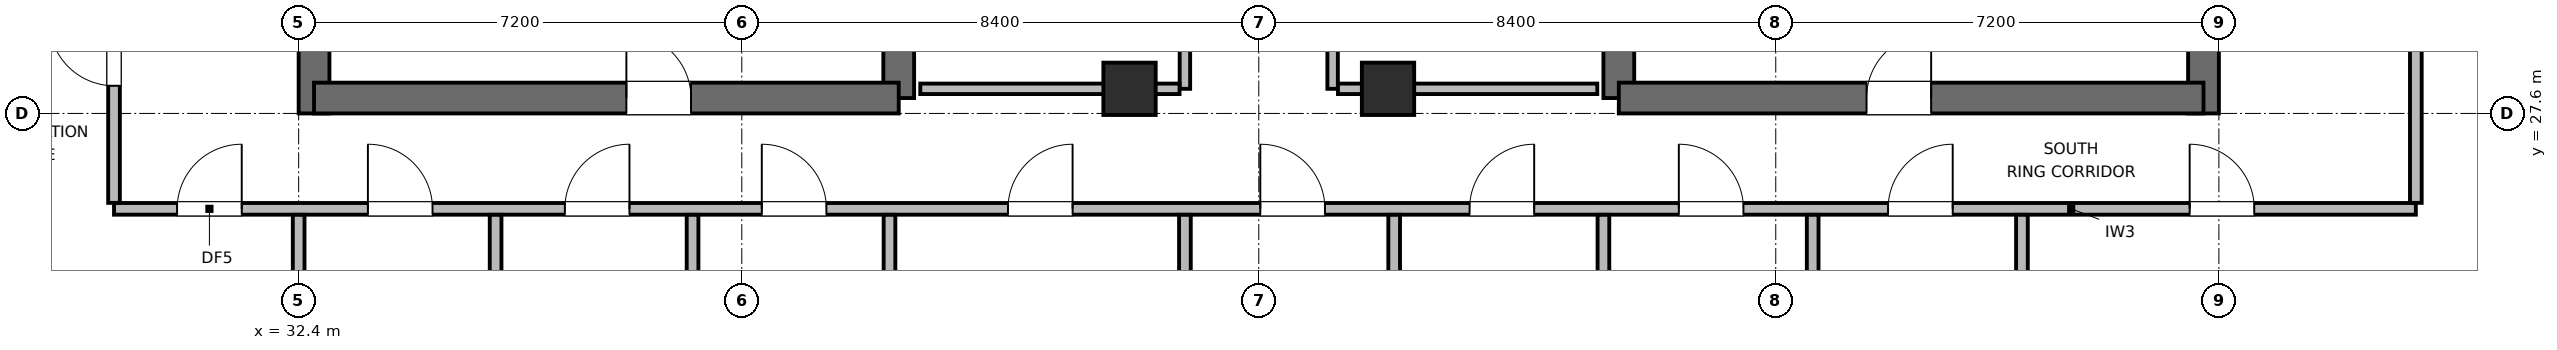
"""IFC4 building model, lengths in metres.
Left out: names, types, materials, properties, quantities, classifications, styles, units other than length and angle.
Written with IfcOpenShell. Run it as: python <this file> out.ifc"""

import sys

from ifc_helpers import new_model, si_unit, direction, frame, frame_2d, origin, origin_2d, place, context, subcontext, project, spatial, rectangle, extrude, element, fill, save


model = new_model("IFC4")
c1 = context("Model", 3, precision=1e-05, world=origin(), true_north=direction((0.0, 1.0)))
c2 = subcontext(c1, "Body", "Model", "MODEL_VIEW")
j1 = project(units=[si_unit("LENGTHUNIT", "METRE"), si_unit("PLANEANGLEUNIT", "RADIAN")], contexts=[c1])
p1 = place(None, origin())
s1 = spatial("IfcSite", under=j1, at=p1, CompositionType="ELEMENT")
p2 = place(p1, origin())
s2 = spatial("IfcBuilding", under=s1, at=p2, CompositionType="ELEMENT")
p3 = place(p2, frame((0.0, 0.0, 346.5)))
s3 = spatial("IfcBuildingStorey", under=s2, at=p3, CompositionType="ELEMENT", Elevation=346.5)
p4 = place(p3, frame((32.65, 27.6, 0.0), z_axis=(0.0, 0.0, 1.0), x_axis=(0.0, 1.0, 0.0)))
e1 = element("IfcWall", 1, at=p4, inside=s3, PredefinedType="SHEAR", context=c2, shape_type="SweptSolid", body=[
    extrude(rectangle(XDim=16.8, YDim=0.5, at=frame_2d((8.4, 0.0))), origin(), (0.0, 0.0, 1.0), 3.9),
])
p5 = place(p3, frame((42.15, 27.85, 0.0), z_axis=(0.0, 0.0, 1.0), x_axis=(0.0, 1.0, 0.0)))
e2 = element("IfcWall", 2, at=p5, inside=s3, PredefinedType="SHEAR", context=c2, shape_type="SweptSolid", body=[
    extrude(rectangle(XDim=6.55, YDim=0.5, at=frame_2d((3.275, 0.0))), origin(), (0.0, 0.0, 1.0), 3.9),
])
p6 = place(p3, frame((32.65, 27.85, 0.0), z_axis=(0.0, 0.0, 1.0), x_axis=(1.0, 0.0, 0.0)))
e3 = element("IfcWall", 3, at=p6, inside=s3, PredefinedType="SHEAR", context=c2, shape_type="SweptSolid", body=[
    extrude(rectangle(XDim=9.5, YDim=0.5, at=frame_2d((4.75, 0.0))), origin(), (0.0, 0.0, 1.0), 3.9),
])
p7 = place(p6, frame((5.075, 0.0, 0.0)))
e4 = element("IfcOpeningElement", 4, at=p7, cuts=e3, PredefinedType="OPENING", context=c2, shape_type="SweptSolid", body=[
    extrude(rectangle(XDim=1.05, YDim=2.04, at=frame_2d((0.525, 1.02))), frame((0.0, 0.26, 0.0), z_axis=(0.0, -1.0, 0.0), x_axis=(1.0, 0.0, 0.0)), (0.0, 0.0, 1.0), 0.52),
])
p8 = place(p3, frame((53.85, 27.85, 0.0), z_axis=(0.0, 0.0, 1.0), x_axis=(0.0, 1.0, 0.0)))
e5 = element("IfcWall", 5, at=p8, inside=s3, PredefinedType="SHEAR", context=c2, shape_type="SweptSolid", body=[
    extrude(rectangle(XDim=7.95, YDim=0.5, at=frame_2d((3.975, 0.0))), origin(), (0.0, 0.0, 1.0), 3.9),
])
p9 = place(p3, frame((63.35, 27.6, 0.0), z_axis=(0.0, 0.0, 1.0), x_axis=(0.0, 1.0, 0.0)))
e6 = element("IfcWall", 6, at=p9, inside=s3, PredefinedType="SHEAR", context=c2, shape_type="SweptSolid", body=[
    extrude(rectangle(XDim=16.8, YDim=0.5, at=frame_2d((8.4, 0.0))), origin(), (0.0, 0.0, 1.0), 3.9),
])
p10 = place(p3, frame((53.85, 27.85, 0.0), z_axis=(0.0, 0.0, 1.0), x_axis=(1.0, 0.0, 0.0)))
e7 = element("IfcWall", 7, at=p10, inside=s3, PredefinedType="SHEAR", context=c2, shape_type="SweptSolid", body=[
    extrude(rectangle(XDim=9.5, YDim=0.5, at=frame_2d((4.75, 0.0))), origin(), (0.0, 0.0, 1.0), 3.9),
])
p11 = place(p10, frame((4.025, 0.0, 0.0)))
e8 = element("IfcOpeningElement", 8, at=p11, cuts=e7, PredefinedType="OPENING", context=c2, shape_type="SweptSolid", body=[
    extrude(rectangle(XDim=1.05, YDim=2.04, at=frame_2d((0.525, 1.02))), frame((0.0, 0.26, 0.0), z_axis=(0.0, -1.0, 0.0), x_axis=(1.0, 0.0, 0.0)), (0.0, 0.0, 1.0), 0.52),
])
for number, where, z_axis, x_axis in (
    (9, (45.9, 28.0, 0.0), (0.0, 0.0, 1.0), (1.0, 0.0, 0.0)),
    (10, (50.1, 28.0, 0.0), (0.0, 0.0, 1.0), (1.0, 0.0, 0.0)),
):
    element("IfcColumn", number, at=place(p3, frame(where, z_axis=z_axis, x_axis=x_axis)), inside=s3, PredefinedType="COLUMN", context=c2, shape_type="SweptSolid", body=[
        extrude(rectangle(XDim=0.85, YDim=0.85, at=origin_2d()), origin(), (0.0, 0.0, 1.0), 3.9),
    ])
p12 = place(p3, frame((46.8, 28.0, 0.0), z_axis=(0.0, 0.0, 1.0), x_axis=(0.0, 1.0, 0.0)))
e11 = element("IfcWall", 11, at=p12, inside=s3, PredefinedType="PARTITIONING", context=c2, shape_type="SweptSolid", body=[
    extrude(rectangle(XDim=4.5, YDim=0.17, at=frame_2d((2.25, 0.0))), origin(), (0.0, 0.0, 1.0), 3.68),
])
p13 = place(p12, frame((0.99, 0.0, 0.0)))
e12 = element("IfcOpeningElement", 12, at=p13, cuts=e11, PredefinedType="OPENING", context=c2, shape_type="SweptSolid", body=[
    extrude(rectangle(XDim=0.9, YDim=2.02, at=frame_2d((0.45, 1.01))), frame((0.0, 0.095, 0.0), z_axis=(0.0, -1.0, 0.0), x_axis=(1.0, 0.0, 0.0)), (0.0, 0.0, 1.0), 0.19),
])
p14 = place(p12, frame((3.24, 0.0, 0.0)))
e13 = element("IfcOpeningElement", 13, at=p14, cuts=e11, PredefinedType="OPENING", context=c2, shape_type="SweptSolid", body=[
    extrude(rectangle(XDim=0.9, YDim=2.02, at=frame_2d((0.45, 1.01))), frame((0.0, 0.095, 0.0), z_axis=(0.0, -1.0, 0.0), x_axis=(1.0, 0.0, 0.0)), (0.0, 0.0, 1.0), 0.19),
])
p15 = place(p3, frame((42.5, 28.0, 0.0), z_axis=(0.0, 0.0, 1.0), x_axis=(1.0, 0.0, 0.0)))
e14 = element("IfcWall", 14, at=p15, inside=s3, PredefinedType="PARTITIONING", context=c2, shape_type="SweptSolid", body=[
    extrude(rectangle(XDim=4.213, YDim=0.17, at=frame_2d((2.106, 0.0))), origin(), (0.0, 0.0, 1.0), 2.765),
])
p16 = place(p3, frame((49.2, 28.0, 0.0), z_axis=(0.0, 0.0, 1.0), x_axis=(0.0, 1.0, 0.0)))
e15 = element("IfcWall", 15, at=p16, inside=s3, PredefinedType="PARTITIONING", context=c2, shape_type="SweptSolid", body=[
    extrude(rectangle(XDim=4.5, YDim=0.17, at=frame_2d((2.25, 0.0))), origin(), (0.0, 0.0, 1.0), 3.68),
])
p17 = place(p16, frame((0.675, 0.0, 0.0)))
e16 = element("IfcOpeningElement", 16, at=p17, cuts=e15, PredefinedType="OPENING", context=c2, shape_type="SweptSolid", body=[
    extrude(rectangle(XDim=0.9, YDim=2.02, at=frame_2d((0.45, 1.01))), frame((0.0, 0.095, 0.0), z_axis=(0.0, -1.0, 0.0), x_axis=(1.0, 0.0, 0.0)), (0.0, 0.0, 1.0), 0.19),
])
p18 = place(p16, frame((2.925, 0.0, 0.0)))
e17 = element("IfcOpeningElement", 17, at=p18, cuts=e15, PredefinedType="OPENING", context=c2, shape_type="SweptSolid", body=[
    extrude(rectangle(XDim=0.9, YDim=2.02, at=frame_2d((0.45, 1.01))), frame((0.0, 0.095, 0.0), z_axis=(0.0, -1.0, 0.0), x_axis=(1.0, 0.0, 0.0)), (0.0, 0.0, 1.0), 0.19),
])
p19 = place(p3, frame((49.287, 28.0, 0.0), z_axis=(0.0, 0.0, 1.0), x_axis=(1.0, 0.0, 0.0)))
e18 = element("IfcWall", 18, at=p19, inside=s3, PredefinedType="PARTITIONING", context=c2, shape_type="SweptSolid", body=[
    extrude(rectangle(XDim=4.213, YDim=0.17, at=frame_2d((2.106, 0.0))), origin(), (0.0, 0.0, 1.0), 2.765),
])
p20 = place(p3, frame((29.4, 26.05, 0.0), z_axis=(0.0, 0.0, 1.0), x_axis=(1.0, 0.0, 0.0)))
e19 = element("IfcWall", 19, at=p20, inside=s3, PredefinedType="PLUMBINGWALL", context=c2, shape_type="SweptSolid", body=[
    extrude(rectangle(XDim=37.4, YDim=0.19, at=frame_2d((18.7, 0.0))), origin(), (0.0, 0.0, 1.0), 3.68),
])
p21 = place(p20, frame((1.025, 0.0, 0.0)))
e20 = element("IfcOpeningElement", 20, at=p21, cuts=e19, PredefinedType="OPENING", context=c2, shape_type="SweptSolid", body=[
    extrude(rectangle(XDim=1.05, YDim=2.04, at=frame_2d((0.525, 1.02))), frame((0.0, 0.105, 0.0), z_axis=(0.0, -1.0, 0.0), x_axis=(1.0, 0.0, 0.0)), (0.0, 0.0, 1.0), 0.21),
])
p22 = place(p20, frame((4.125, 0.0, 0.0)))
e21 = element("IfcOpeningElement", 21, at=p22, cuts=e19, PredefinedType="OPENING", context=c2, shape_type="SweptSolid", body=[
    extrude(rectangle(XDim=1.05, YDim=2.04, at=frame_2d((0.525, 1.02))), frame((0.0, 0.105, 0.0), z_axis=(0.0, -1.0, 0.0), x_axis=(1.0, 0.0, 0.0)), (0.0, 0.0, 1.0), 0.21),
])
p23 = place(p20, frame((7.325, 0.0, 0.0)))
e22 = element("IfcOpeningElement", 22, at=p23, cuts=e19, PredefinedType="OPENING", context=c2, shape_type="SweptSolid", body=[
    extrude(rectangle(XDim=1.05, YDim=2.04, at=frame_2d((0.525, 1.02))), frame((0.0, 0.105, 0.0), z_axis=(0.0, -1.0, 0.0), x_axis=(1.0, 0.0, 0.0)), (0.0, 0.0, 1.0), 0.21),
])
p24 = place(p20, frame((10.525, 0.0, 0.0)))
e23 = element("IfcOpeningElement", 23, at=p24, cuts=e19, PredefinedType="OPENING", context=c2, shape_type="SweptSolid", body=[
    extrude(rectangle(XDim=1.05, YDim=2.04, at=frame_2d((0.525, 1.02))), frame((0.0, 0.105, 0.0), z_axis=(0.0, -1.0, 0.0), x_axis=(1.0, 0.0, 0.0)), (0.0, 0.0, 1.0), 0.21),
])
p25 = place(p20, frame((14.525, 0.0, 0.0)))
e24 = element("IfcOpeningElement", 24, at=p25, cuts=e19, PredefinedType="OPENING", context=c2, shape_type="SweptSolid", body=[
    extrude(rectangle(XDim=1.05, YDim=2.04, at=frame_2d((0.525, 1.02))), frame((0.0, 0.105, 0.0), z_axis=(0.0, -1.0, 0.0), x_axis=(1.0, 0.0, 0.0)), (0.0, 0.0, 1.0), 0.21),
])
p26 = place(p20, frame((18.625, 0.0, 0.0)))
e25 = element("IfcOpeningElement", 25, at=p26, cuts=e19, PredefinedType="OPENING", context=c2, shape_type="SweptSolid", body=[
    extrude(rectangle(XDim=1.05, YDim=2.04, at=frame_2d((0.525, 1.02))), frame((0.0, 0.105, 0.0), z_axis=(0.0, -1.0, 0.0), x_axis=(1.0, 0.0, 0.0)), (0.0, 0.0, 1.0), 0.21),
])
p27 = place(p20, frame((22.025, 0.0, 0.0)))
e26 = element("IfcOpeningElement", 26, at=p27, cuts=e19, PredefinedType="OPENING", context=c2, shape_type="SweptSolid", body=[
    extrude(rectangle(XDim=1.05, YDim=2.04, at=frame_2d((0.525, 1.02))), frame((0.0, 0.105, 0.0), z_axis=(0.0, -1.0, 0.0), x_axis=(1.0, 0.0, 0.0)), (0.0, 0.0, 1.0), 0.21),
])
p28 = place(p20, frame((25.425, 0.0, 0.0)))
e27 = element("IfcOpeningElement", 27, at=p28, cuts=e19, PredefinedType="OPENING", context=c2, shape_type="SweptSolid", body=[
    extrude(rectangle(XDim=1.05, YDim=2.04, at=frame_2d((0.525, 1.02))), frame((0.0, 0.105, 0.0), z_axis=(0.0, -1.0, 0.0), x_axis=(1.0, 0.0, 0.0)), (0.0, 0.0, 1.0), 0.21),
])
p29 = place(p20, frame((28.825, 0.0, 0.0)))
e28 = element("IfcOpeningElement", 28, at=p29, cuts=e19, PredefinedType="OPENING", context=c2, shape_type="SweptSolid", body=[
    extrude(rectangle(XDim=1.05, YDim=2.04, at=frame_2d((0.525, 1.02))), frame((0.0, 0.105, 0.0), z_axis=(0.0, -1.0, 0.0), x_axis=(1.0, 0.0, 0.0)), (0.0, 0.0, 1.0), 0.21),
])
p30 = place(p20, frame((33.725, 0.0, 0.0)))
e29 = element("IfcOpeningElement", 29, at=p30, cuts=e19, PredefinedType="OPENING", context=c2, shape_type="SweptSolid", body=[
    extrude(rectangle(XDim=1.05, YDim=2.04, at=frame_2d((0.525, 1.02))), frame((0.0, 0.105, 0.0), z_axis=(0.0, -1.0, 0.0), x_axis=(1.0, 0.0, 0.0)), (0.0, 0.0, 1.0), 0.21),
])
p31 = place(p3, frame((29.4, 26.147, 0.0), z_axis=(0.0, 0.0, 1.0), x_axis=(0.0, 1.0, 0.0)))
e30 = element("IfcWall", 30, at=p31, inside=s3, PredefinedType="PLUMBINGWALL", context=c2, shape_type="SweptSolid", body=[
    extrude(rectangle(XDim=19.706, YDim=0.19, at=frame_2d((9.853, 0.0))), origin(), (0.0, 0.0, 1.0), 3.68),
])
p32 = place(p31, frame((1.903, 0.0, 0.0)))
e31 = element("IfcOpeningElement", 31, at=p32, cuts=e30, PredefinedType="OPENING", context=c2, shape_type="SweptSolid", body=[
    extrude(rectangle(XDim=1.05, YDim=2.04, at=frame_2d((0.525, 1.02))), frame((0.0, 0.105, 0.0), z_axis=(0.0, -1.0, 0.0), x_axis=(1.0, 0.0, 0.0)), (0.0, 0.0, 1.0), 0.21),
])
p33 = place(p31, frame((6.878, 0.0, 0.0)))
e32 = element("IfcOpeningElement", 32, at=p33, cuts=e30, PredefinedType="OPENING", context=c2, shape_type="SweptSolid", body=[
    extrude(rectangle(XDim=1.05, YDim=2.04, at=frame_2d((0.525, 1.02))), frame((0.0, 0.105, 0.0), z_axis=(0.0, -1.0, 0.0), x_axis=(1.0, 0.0, 0.0)), (0.0, 0.0, 1.0), 0.21),
])
p34 = place(p31, frame((11.878, 0.0, 0.0)))
e33 = element("IfcOpeningElement", 33, at=p34, cuts=e30, PredefinedType="OPENING", context=c2, shape_type="SweptSolid", body=[
    extrude(rectangle(XDim=1.05, YDim=2.04, at=frame_2d((0.525, 1.02))), frame((0.0, 0.105, 0.0), z_axis=(0.0, -1.0, 0.0), x_axis=(1.0, 0.0, 0.0)), (0.0, 0.0, 1.0), 0.21),
])
p35 = place(p31, frame((16.853, 0.0, 0.0)))
e34 = element("IfcOpeningElement", 34, at=p35, cuts=e30, PredefinedType="OPENING", context=c2, shape_type="SweptSolid", body=[
    extrude(rectangle(XDim=1.05, YDim=2.04, at=frame_2d((0.525, 1.02))), frame((0.0, 0.105, 0.0), z_axis=(0.0, -1.0, 0.0), x_axis=(1.0, 0.0, 0.0)), (0.0, 0.0, 1.0), 0.21),
])
p36 = place(p3, frame((66.8, 26.147, 0.0), z_axis=(0.0, 0.0, 1.0), x_axis=(0.0, 1.0, 0.0)))
e35 = element("IfcWall", 35, at=p36, inside=s3, PredefinedType="PLUMBINGWALL", context=c2, shape_type="SweptSolid", body=[
    extrude(rectangle(XDim=19.706, YDim=0.19, at=frame_2d((9.853, 0.0))), origin(), (0.0, 0.0, 1.0), 3.68),
])
p37 = place(p36, frame((3.903, 0.0, 0.0)))
e36 = element("IfcOpeningElement", 36, at=p37, cuts=e35, PredefinedType="OPENING", context=c2, shape_type="SweptSolid", body=[
    extrude(rectangle(XDim=1.05, YDim=2.04, at=frame_2d((0.525, 1.02))), frame((0.0, 0.105, 0.0), z_axis=(0.0, -1.0, 0.0), x_axis=(1.0, 0.0, 0.0)), (0.0, 0.0, 1.0), 0.21),
])
p38 = place(p36, frame((13.853, 0.0, 0.0)))
e37 = element("IfcOpeningElement", 37, at=p38, cuts=e35, PredefinedType="OPENING", context=c2, shape_type="SweptSolid", body=[
    extrude(rectangle(XDim=1.05, YDim=2.04, at=frame_2d((0.525, 1.02))), frame((0.0, 0.105, 0.0), z_axis=(0.0, -1.0, 0.0), x_axis=(1.0, 0.0, 0.0)), (0.0, 0.0, 1.0), 0.21),
])
p39 = place(p3, frame((32.4, 18.875, 0.0), z_axis=(0.0, 0.0, 1.0), x_axis=(0.0, 1.0, 0.0)))
e38 = element("IfcWall", 38, at=p39, inside=s3, PredefinedType="PLUMBINGWALL", context=c2, shape_type="SweptSolid", body=[
    extrude(rectangle(XDim=7.078, YDim=0.19, at=frame_2d((3.539, 0.0))), origin(), (0.0, 0.0, 1.0), 3.054),
])
for number, where, z_axis, x_axis in (
    (39, (35.6, 18.875, 0.0), (0.0, 0.0, 1.0), (0.0, 1.0, 0.0)),
    (40, (38.8, 18.875, 0.0), (0.0, 0.0, 1.0), (0.0, 1.0, 0.0)),
):
    element("IfcWall", number, at=place(p3, frame(where, z_axis=z_axis, x_axis=x_axis)), inside=s3, PredefinedType="PLUMBINGWALL", context=c2, shape_type="SweptSolid", body=[
        extrude(rectangle(XDim=7.078, YDim=0.19, at=frame_2d((3.539, 0.0))), origin(), (0.0, 0.0, 1.0), 3.68),
    ])
p40 = place(p3, frame((42.0, 19.183, 0.0), z_axis=(0.0, 0.0, 1.0), x_axis=(0.0, 1.0, 0.0)))
e41 = element("IfcWall", 41, at=p40, inside=s3, PredefinedType="PLUMBINGWALL", context=c2, shape_type="SweptSolid", body=[
    extrude(rectangle(XDim=6.77, YDim=0.19, at=frame_2d((3.385, 0.0))), origin(), (0.0, 0.0, 1.0), 3.043),
])
p41 = place(p3, frame((46.8, 22.155, 0.0), z_axis=(0.0, 0.0, 1.0), x_axis=(0.0, 1.0, 0.0)))
e42 = element("IfcWall", 42, at=p41, inside=s3, PredefinedType="PLUMBINGWALL", context=c2, shape_type="SweptSolid", body=[
    extrude(rectangle(XDim=3.798, YDim=0.19, at=frame_2d((1.899, 0.0))), origin(), (0.0, 0.0, 1.0), 3.68),
])
p42 = place(p3, frame((50.2, 20.075, 0.0), z_axis=(0.0, 0.0, 1.0), x_axis=(0.0, 1.0, 0.0)))
e43 = element("IfcWall", 43, at=p42, inside=s3, PredefinedType="PLUMBINGWALL", context=c2, shape_type="SweptSolid", body=[
    extrude(rectangle(XDim=5.878, YDim=0.19, at=frame_2d((2.939, 0.0))), origin(), (0.0, 0.0, 1.0), 3.68),
])
p43 = place(p3, frame((53.6, 19.367, 0.0), z_axis=(0.0, 0.0, 1.0), x_axis=(0.0, 1.0, 0.0)))
e44 = element("IfcWall", 44, at=p43, inside=s3, PredefinedType="PLUMBINGWALL", context=c2, shape_type="SweptSolid", body=[
    extrude(rectangle(XDim=6.586, YDim=0.19, at=frame_2d((3.293, 0.0))), origin(), (0.0, 0.0, 1.0), 3.043),
])
for number, where, z_axis, x_axis in (
    (45, (57.0, 18.875, 0.0), (0.0, 0.0, 1.0), (0.0, 1.0, 0.0)),
    (46, (60.4, 18.875, 0.0), (0.0, 0.0, 1.0), (0.0, 1.0, 0.0)),
):
    element("IfcWall", number, at=place(p3, frame(where, z_axis=z_axis, x_axis=x_axis)), inside=s3, PredefinedType="PLUMBINGWALL", context=c2, shape_type="SweptSolid", body=[
        extrude(rectangle(XDim=7.078, YDim=0.19, at=frame_2d((3.539, 0.0))), origin(), (0.0, 0.0, 1.0), 3.68),
    ])
p44 = place(p7, origin())
e47 = element("IfcDoor", 47, at=p44, inside=s3, OperationType="SINGLE_SWING_LEFT", PredefinedType="DOOR", context=c2, shape_type="SweptSolid", body=[
    extrude(rectangle(XDim=1.05, YDim=2.04, at=frame_2d((0.525, 1.02))), frame((0.0, 0.025, 0.0), z_axis=(0.0, -1.0, 0.0), x_axis=(1.0, 0.0, 0.0)), (0.0, 0.0, 1.0), 0.05),
])
fill(e4, e47)
p45 = place(p11, origin())
e48 = element("IfcDoor", 48, at=p45, inside=s3, OperationType="SINGLE_SWING_RIGHT", PredefinedType="DOOR", context=c2, shape_type="SweptSolid", body=[
    extrude(rectangle(XDim=1.05, YDim=2.04, at=frame_2d((0.525, 1.02))), frame((0.0, 0.025, 0.0), z_axis=(0.0, -1.0, 0.0), x_axis=(1.0, 0.0, 0.0)), (0.0, 0.0, 1.0), 0.05),
])
fill(e8, e48)
p46 = place(p21, origin())
e49 = element("IfcDoor", 49, at=p46, inside=s3, OperationType="SINGLE_SWING_RIGHT", PredefinedType="DOOR", context=c2, shape_type="SweptSolid", body=[
    extrude(rectangle(XDim=1.05, YDim=2.04, at=frame_2d((0.525, 1.02))), frame((0.0, 0.025, 0.0), z_axis=(0.0, -1.0, 0.0), x_axis=(1.0, 0.0, 0.0)), (0.0, 0.0, 1.0), 0.05),
])
fill(e20, e49)
p47 = place(p22, origin())
e50 = element("IfcDoor", 50, at=p47, inside=s3, OperationType="SINGLE_SWING_LEFT", PredefinedType="DOOR", context=c2, shape_type="SweptSolid", body=[
    extrude(rectangle(XDim=1.05, YDim=2.04, at=frame_2d((0.525, 1.02))), frame((0.0, 0.025, 0.0), z_axis=(0.0, -1.0, 0.0), x_axis=(1.0, 0.0, 0.0)), (0.0, 0.0, 1.0), 0.05),
])
fill(e21, e50)
p48 = place(p23, origin())
e51 = element("IfcDoor", 51, at=p48, inside=s3, OperationType="SINGLE_SWING_RIGHT", PredefinedType="DOOR", context=c2, shape_type="SweptSolid", body=[
    extrude(rectangle(XDim=1.05, YDim=2.04, at=frame_2d((0.525, 1.02))), frame((0.0, 0.025, 0.0), z_axis=(0.0, -1.0, 0.0), x_axis=(1.0, 0.0, 0.0)), (0.0, 0.0, 1.0), 0.05),
])
fill(e22, e51)
p49 = place(p24, origin())
e52 = element("IfcDoor", 52, at=p49, inside=s3, OperationType="SINGLE_SWING_LEFT", PredefinedType="DOOR", context=c2, shape_type="SweptSolid", body=[
    extrude(rectangle(XDim=1.05, YDim=2.04, at=frame_2d((0.525, 1.02))), frame((0.0, 0.025, 0.0), z_axis=(0.0, -1.0, 0.0), x_axis=(1.0, 0.0, 0.0)), (0.0, 0.0, 1.0), 0.05),
])
fill(e23, e52)
p50 = place(p25, origin())
e53 = element("IfcDoor", 53, at=p50, inside=s3, OperationType="SINGLE_SWING_RIGHT", PredefinedType="DOOR", context=c2, shape_type="SweptSolid", body=[
    extrude(rectangle(XDim=1.05, YDim=2.04, at=frame_2d((0.525, 1.02))), frame((0.0, 0.025, 0.0), z_axis=(0.0, -1.0, 0.0), x_axis=(1.0, 0.0, 0.0)), (0.0, 0.0, 1.0), 0.05),
])
fill(e24, e53)
p51 = place(p26, origin())
e54 = element("IfcDoor", 54, at=p51, inside=s3, OperationType="SINGLE_SWING_LEFT", PredefinedType="DOOR", context=c2, shape_type="SweptSolid", body=[
    extrude(rectangle(XDim=1.05, YDim=2.04, at=frame_2d((0.525, 1.02))), frame((0.0, 0.025, 0.0), z_axis=(0.0, -1.0, 0.0), x_axis=(1.0, 0.0, 0.0)), (0.0, 0.0, 1.0), 0.05),
])
fill(e25, e54)
p52 = place(p27, origin())
e55 = element("IfcDoor", 55, at=p52, inside=s3, OperationType="SINGLE_SWING_RIGHT", PredefinedType="DOOR", context=c2, shape_type="SweptSolid", body=[
    extrude(rectangle(XDim=1.05, YDim=2.04, at=frame_2d((0.525, 1.02))), frame((0.0, 0.025, 0.0), z_axis=(0.0, -1.0, 0.0), x_axis=(1.0, 0.0, 0.0)), (0.0, 0.0, 1.0), 0.05),
])
fill(e26, e55)
p53 = place(p28, origin())
e56 = element("IfcDoor", 56, at=p53, inside=s3, OperationType="SINGLE_SWING_LEFT", PredefinedType="DOOR", context=c2, shape_type="SweptSolid", body=[
    extrude(rectangle(XDim=1.05, YDim=2.04, at=frame_2d((0.525, 1.02))), frame((0.0, 0.025, 0.0), z_axis=(0.0, -1.0, 0.0), x_axis=(1.0, 0.0, 0.0)), (0.0, 0.0, 1.0), 0.05),
])
fill(e27, e56)
p54 = place(p29, origin())
e57 = element("IfcDoor", 57, at=p54, inside=s3, OperationType="SINGLE_SWING_RIGHT", PredefinedType="DOOR", context=c2, shape_type="SweptSolid", body=[
    extrude(rectangle(XDim=1.05, YDim=2.04, at=frame_2d((0.525, 1.02))), frame((0.0, 0.025, 0.0), z_axis=(0.0, -1.0, 0.0), x_axis=(1.0, 0.0, 0.0)), (0.0, 0.0, 1.0), 0.05),
])
fill(e28, e57)
p55 = place(p30, origin())
e58 = element("IfcDoor", 58, at=p55, inside=s3, OperationType="SINGLE_SWING_LEFT", PredefinedType="DOOR", context=c2, shape_type="SweptSolid", body=[
    extrude(rectangle(XDim=1.05, YDim=2.04, at=frame_2d((0.525, 1.02))), frame((0.0, 0.025, 0.0), z_axis=(0.0, -1.0, 0.0), x_axis=(1.0, 0.0, 0.0)), (0.0, 0.0, 1.0), 0.05),
])
fill(e29, e58)
p56 = place(p32, origin())
e59 = element("IfcDoor", 59, at=p56, inside=s3, OperationType="SINGLE_SWING_RIGHT", PredefinedType="DOOR", context=c2, shape_type="SweptSolid", body=[
    extrude(rectangle(XDim=1.05, YDim=2.04, at=frame_2d((0.525, 1.02))), frame((0.0, 0.025, 0.0), z_axis=(0.0, -1.0, 0.0), x_axis=(1.0, 0.0, 0.0)), (0.0, 0.0, 1.0), 0.05),
])
fill(e31, e59)
save(model, sys.argv[1])
